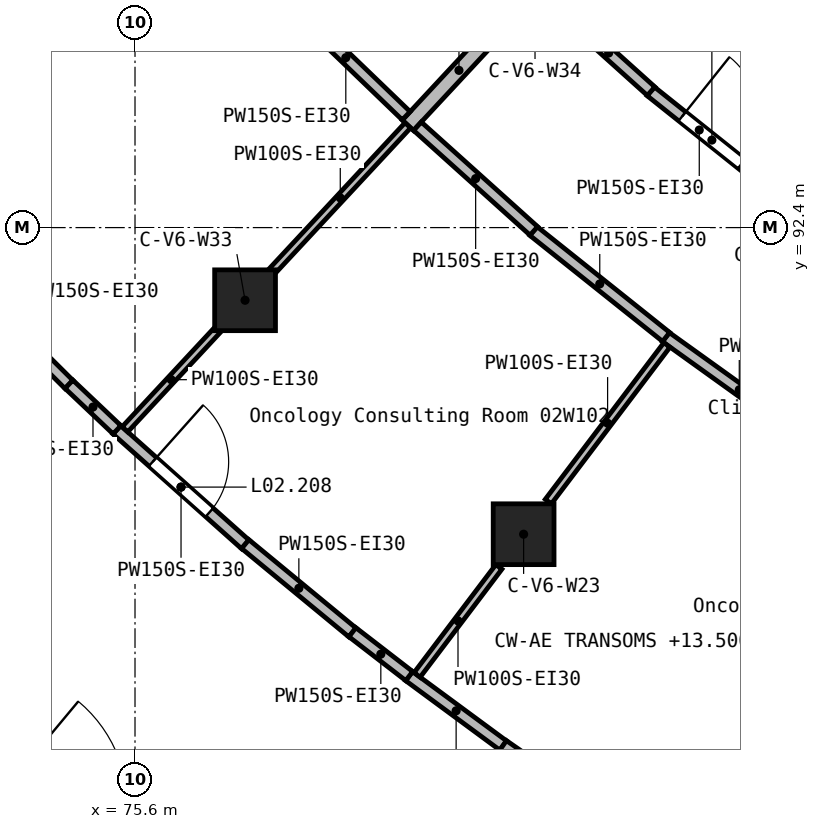
"""IFC4 building model, lengths in metres.
Left out: names, types, materials, properties, quantities, classifications, styles, units other than length and angle.
Written with IfcOpenShell. Run it as: python <this file> out.ifc"""

import sys

from ifc_helpers import new_model, si_unit, direction, frame, frame_2d, origin, origin_2d, place, context, subcontext, project, spatial, rectangle, extrude, element, fill, save


model = new_model("IFC4")
c1 = context("Model", 3, precision=1e-05, world=origin(), true_north=direction((0.0, 1.0)))
c2 = subcontext(c1, "Body", "Model", "MODEL_VIEW")
j1 = project(units=[si_unit("LENGTHUNIT", "METRE"), si_unit("PLANEANGLEUNIT", "RADIAN")], contexts=[c1])
p1 = place(None, origin())
s1 = spatial("IfcSite", under=j1, at=p1, CompositionType="ELEMENT")
p2 = place(p1, origin())
s2 = spatial("IfcBuilding", under=s1, at=p2, CompositionType="ELEMENT")
p3 = place(p2, frame((0.0, 0.0, 12.6)))
s3 = spatial("IfcBuildingStorey", under=s2, at=p3, CompositionType="ELEMENT", Elevation=12.6)
for number, where, z_axis, x_axis in (
    (1, (77.048, 91.444, 0.0), (0.0, 0.0, 1.0), (1.0, 0.0, 0.0)),
    (2, (80.713, 88.366, 0.0), (0.0, 0.0, 1.0), (1.0, 0.0, 0.0)),
):
    element("IfcColumn", number, at=place(p3, frame(where, z_axis=z_axis, x_axis=x_axis)), inside=s3, PredefinedType="COLUMN", context=c2, shape_type="SweptSolid", body=[
        extrude(rectangle(XDim=0.8, YDim=0.8, at=origin_2d()), origin(), (0.0, 0.0, 1.0), 4.2),
    ])
p4 = place(p3, frame((79.19, 93.746, 0.0), z_axis=(0.0, 0.0, 1.0), x_axis=(0.681171780306, 0.732123627344, 0.0)))
e3 = element("IfcWall", 3, at=p4, inside=s3, PredefinedType="SOLIDWALL", context=c2, shape_type="SweptSolid", body=[
    extrude(rectangle(XDim=1.974, YDim=0.2, at=frame_2d((0.987, 0.0))), origin(), (0.0, 0.0, 1.0), 3.85),
])
p5 = place(p3, frame((82.583, 90.961, 0.0), z_axis=(0.0, 0.0, 1.0), x_axis=(0.812456963848, -0.583021167622, 0.0)))
e4 = element("IfcWall", 4, at=p5, inside=s3, PredefinedType="PARTITIONING", context=c2, shape_type="SweptSolid", body=[
    extrude(rectangle(XDim=2.381, YDim=0.15, at=frame_2d((1.191, 0.0))), origin(), (0.0, 0.0, 1.0), 3.85),
])
p6 = place(p3, frame((80.841, 92.356, 0.0), z_axis=(0.0, 0.0, 1.0), x_axis=(0.781561025488, -0.62382879337, 0.0)))
e5 = element("IfcWall", 5, at=p6, inside=s3, PredefinedType="PARTITIONING", context=c2, shape_type="SweptSolid", body=[
    extrude(rectangle(XDim=2.235, YDim=0.15, at=frame_2d((1.118, 0.0))), origin(), (0.0, 0.0, 1.0), 3.85),
])
p7 = place(p3, frame((77.579, 95.4, 0.0), z_axis=(0.0, 0.0, 1.0), x_axis=(0.720594722174, -0.693356507415, 0.0)))
e6 = element("IfcWall", 6, at=p7, inside=s3, PredefinedType="PARTITIONING", context=c2, shape_type="SweptSolid", body=[
    extrude(rectangle(XDim=2.205, YDim=0.15, at=frame_2d((1.103, 0.0))), origin(), (0.0, 0.0, 1.0), 3.85),
])
p8 = place(p3, frame((79.316, 93.733, 0.0), z_axis=(0.0, 0.0, 1.0), x_axis=(0.74346507851, -0.668774758073, 0.0)))
e7 = element("IfcWall", 7, at=p8, inside=s3, PredefinedType="PARTITIONING", context=c2, shape_type="SweptSolid", body=[
    extrude(rectangle(XDim=2.059, YDim=0.15, at=frame_2d((1.03, 0.0))), origin(), (0.0, 0.0, 1.0), 3.85),
])
p9 = place(p3, frame((75.36, 89.74, 0.0), z_axis=(0.0, 0.0, 1.0), x_axis=(0.746361982095, -0.665540225443, 0.0)))
e8 = element("IfcWall", 8, at=p9, inside=s3, PredefinedType="PARTITIONING", context=c2, shape_type="SweptSolid", body=[
    extrude(rectangle(XDim=2.266, YDim=0.15, at=frame_2d((1.133, 0.0))), origin(), (0.0, 0.0, 1.0), 3.85),
])
p10 = place(p9, frame((0.633, 0.0, 0.0)))
e9 = element("IfcOpeningElement", 9, at=p10, cuts=e8, PredefinedType="OPENING", context=c2, shape_type="SweptSolid", body=[
    extrude(rectangle(XDim=1.0, YDim=2.1, at=frame_2d((0.5, 1.05))), frame((0.0, 0.085, 0.0), z_axis=(0.0, -1.0, 0.0), x_axis=(1.0, 0.0, 0.0)), (0.0, 0.0, 1.0), 0.17),
])
p11 = place(p3, frame((82.385, 94.194, 0.0), z_axis=(0.0, 0.0, 1.0), x_axis=(0.781756052881, -0.623584375833, 0.0)))
e10 = element("IfcWall", 10, at=p11, inside=s3, PredefinedType="PARTITIONING", context=c2, shape_type="SweptSolid", body=[
    extrude(rectangle(XDim=1.636, YDim=0.15, at=frame_2d((0.818, 0.0))), origin(), (0.0, 0.0, 1.0), 3.85),
])
p12 = place(p11, frame((0.53, 0.0, 0.0)))
e11 = element("IfcOpeningElement", 11, at=p12, cuts=e10, PredefinedType="OPENING", context=c2, shape_type="SweptSolid", body=[
    extrude(rectangle(XDim=1.0, YDim=2.1, at=frame_2d((0.5, 1.05))), frame((0.0, 0.085, 0.0), z_axis=(0.0, -1.0, 0.0), x_axis=(1.0, 0.0, 0.0)), (0.0, 0.0, 1.0), 0.17),
])
p13 = place(p3, frame((81.273, 95.199, 0.0), z_axis=(0.0, 0.0, 1.0), x_axis=(0.743576936712, -0.668650386368, 0.0)))
e12 = element("IfcWall", 12, at=p13, inside=s3, PredefinedType="PARTITIONING", context=c2, shape_type="SweptSolid", body=[
    extrude(rectangle(XDim=1.502, YDim=0.15, at=frame_2d((0.751, 0.0))), origin(), (0.0, 0.0, 1.0), 3.85),
])
p14 = place(p3, frame((77.051, 88.236, 0.0), z_axis=(0.0, 0.0, 1.0), x_axis=(0.771517511576, -0.636208086502, 0.0)))
e13 = element("IfcWall", 13, at=p14, inside=s3, PredefinedType="PARTITIONING", context=c2, shape_type="SweptSolid", body=[
    extrude(rectangle(XDim=1.828, YDim=0.15, at=frame_2d((0.914, 0.0))), origin(), (0.0, 0.0, 1.0), 3.85),
])
p15 = place(p3, frame((79.206, 86.5, 0.0), z_axis=(0.0, 0.0, 1.0), x_axis=(0.804960127747, -0.593328907721, 0.0)))
e14 = element("IfcWall", 14, at=p15, inside=s3, PredefinedType="PARTITIONING", context=c2, shape_type="SweptSolid", body=[
    extrude(rectangle(XDim=1.539, YDim=0.15, at=frame_2d((0.77, 0.0))), origin(), (0.0, 0.0, 1.0), 3.85),
])
p16 = place(p3, frame((73.851, 91.211, 0.0), z_axis=(0.0, 0.0, 1.0), x_axis=(0.709168733207, -0.70503879882, 0.0)))
e15 = element("IfcWall", 15, at=p16, inside=s3, PredefinedType="PARTITIONING", context=c2, shape_type="SweptSolid", body=[
    extrude(rectangle(XDim=1.241, YDim=0.15, at=frame_2d((0.621, 0.0))), origin(), (0.0, 0.0, 1.0), 3.85),
])
p17 = place(p3, frame((80.444, 85.589, 0.0), z_axis=(0.0, 0.0, 1.0), x_axis=(0.821096473197, -0.570789437274, 0.0)))
e16 = element("IfcWall", 16, at=p17, inside=s3, PredefinedType="PARTITIONING", context=c2, shape_type="SweptSolid", body=[
    extrude(rectangle(XDim=1.093, YDim=0.15, at=frame_2d((0.546, 0.0))), origin(), (0.0, 0.0, 1.0), 3.85),
])
p18 = place(p3, frame((78.46, 87.077, 0.0), z_axis=(0.0, 0.0, 1.0), x_axis=(0.791671493317, -0.610947008069, 0.0)))
e17 = element("IfcWall", 17, at=p18, inside=s3, PredefinedType="PARTITIONING", context=c2, shape_type="SweptSolid", body=[
    extrude(rectangle(XDim=0.944, YDim=0.15, at=frame_2d((0.472, 0.0))), origin(), (0.0, 0.0, 1.0), 3.85),
])
p19 = place(p3, frame((74.731, 90.339, 0.0), z_axis=(0.0, 0.0, 1.0), x_axis=(0.725923200466, -0.687775767984, 0.0)))
e18 = element("IfcWall", 18, at=p19, inside=s3, PredefinedType="PARTITIONING", context=c2, shape_type="SweptSolid", body=[
    extrude(rectangle(XDim=0.87, YDim=0.15, at=frame_2d((0.435, 0.0))), origin(), (0.0, 0.0, 1.0), 3.85),
])
p20 = place(p3, frame((75.468, 89.746, 0.0), z_axis=(0.0, 0.0, 1.0), x_axis=(0.681143154038, 0.732150260334, 0.0)))
e19 = element("IfcWall", 19, at=p20, inside=s3, PredefinedType="PARTITIONING", context=c2, shape_type="SweptSolid", body=[
    extrude(rectangle(XDim=1.785, YDim=0.1, at=frame_2d((0.893, 0.0))), origin(), (0.0, 0.0, 1.0), 3.85),
])
p21 = place(p3, frame((77.412, 91.835, 0.0), z_axis=(0.0, 0.0, 1.0), x_axis=(0.681147107729, 0.732146582067, 0.0)))
e20 = element("IfcWall", 20, at=p21, inside=s3, PredefinedType="PARTITIONING", context=c2, shape_type="SweptSolid", body=[
    extrude(rectangle(XDim=2.609, YDim=0.1, at=frame_2d((1.304, 0.0))), origin(), (0.0, 0.0, 1.0), 3.85),
])
p22 = place(p3, frame((79.312, 86.515, 0.0), z_axis=(0.0, 0.0, 1.0), x_axis=(0.603588624137, 0.797295912954, 0.0)))
e21 = element("IfcWall", 21, at=p22, inside=s3, PredefinedType="PARTITIONING", context=c2, shape_type="SweptSolid", body=[
    extrude(rectangle(XDim=1.782, YDim=0.1, at=frame_2d((0.891, 0.0))), origin(), (0.0, 0.0, 1.0), 3.85),
])
p23 = place(p3, frame((81.038, 88.796, 0.0), z_axis=(0.0, 0.0, 1.0), x_axis=(0.603561177332, 0.797316690668, 0.0)))
e22 = element("IfcWall", 22, at=p23, inside=s3, PredefinedType="PARTITIONING", context=c2, shape_type="SweptSolid", body=[
    extrude(rectangle(XDim=2.584, YDim=0.1, at=frame_2d((1.292, 0.0))), origin(), (0.0, 0.0, 1.0), 3.85),
])
p24 = place(p10, origin())
e23 = element("IfcDoor", 23, at=p24, inside=s3, OperationType="SINGLE_SWING_LEFT", PredefinedType="DOOR", context=c2, shape_type="SweptSolid", body=[
    extrude(rectangle(XDim=1.0, YDim=2.1, at=frame_2d((0.5, 1.05))), frame((0.0, 0.025, 0.0), z_axis=(0.0, -1.0, 0.0), x_axis=(1.0, 0.0, 0.0)), (0.0, 0.0, 1.0), 0.05),
])
fill(e9, e23)
p25 = place(p12, origin())
e24 = element("IfcDoor", 24, at=p25, inside=s3, OperationType="SINGLE_SWING_RIGHT", PredefinedType="DOOR", context=c2, shape_type="SweptSolid", body=[
    extrude(rectangle(XDim=1.0, YDim=2.1, at=frame_2d((0.5, 1.05))), frame((0.0, 0.025, 0.0), z_axis=(0.0, -1.0, 0.0), x_axis=(1.0, 0.0, 0.0)), (0.0, 0.0, 1.0), 0.05),
])
fill(e11, e24)
save(model, sys.argv[1])
